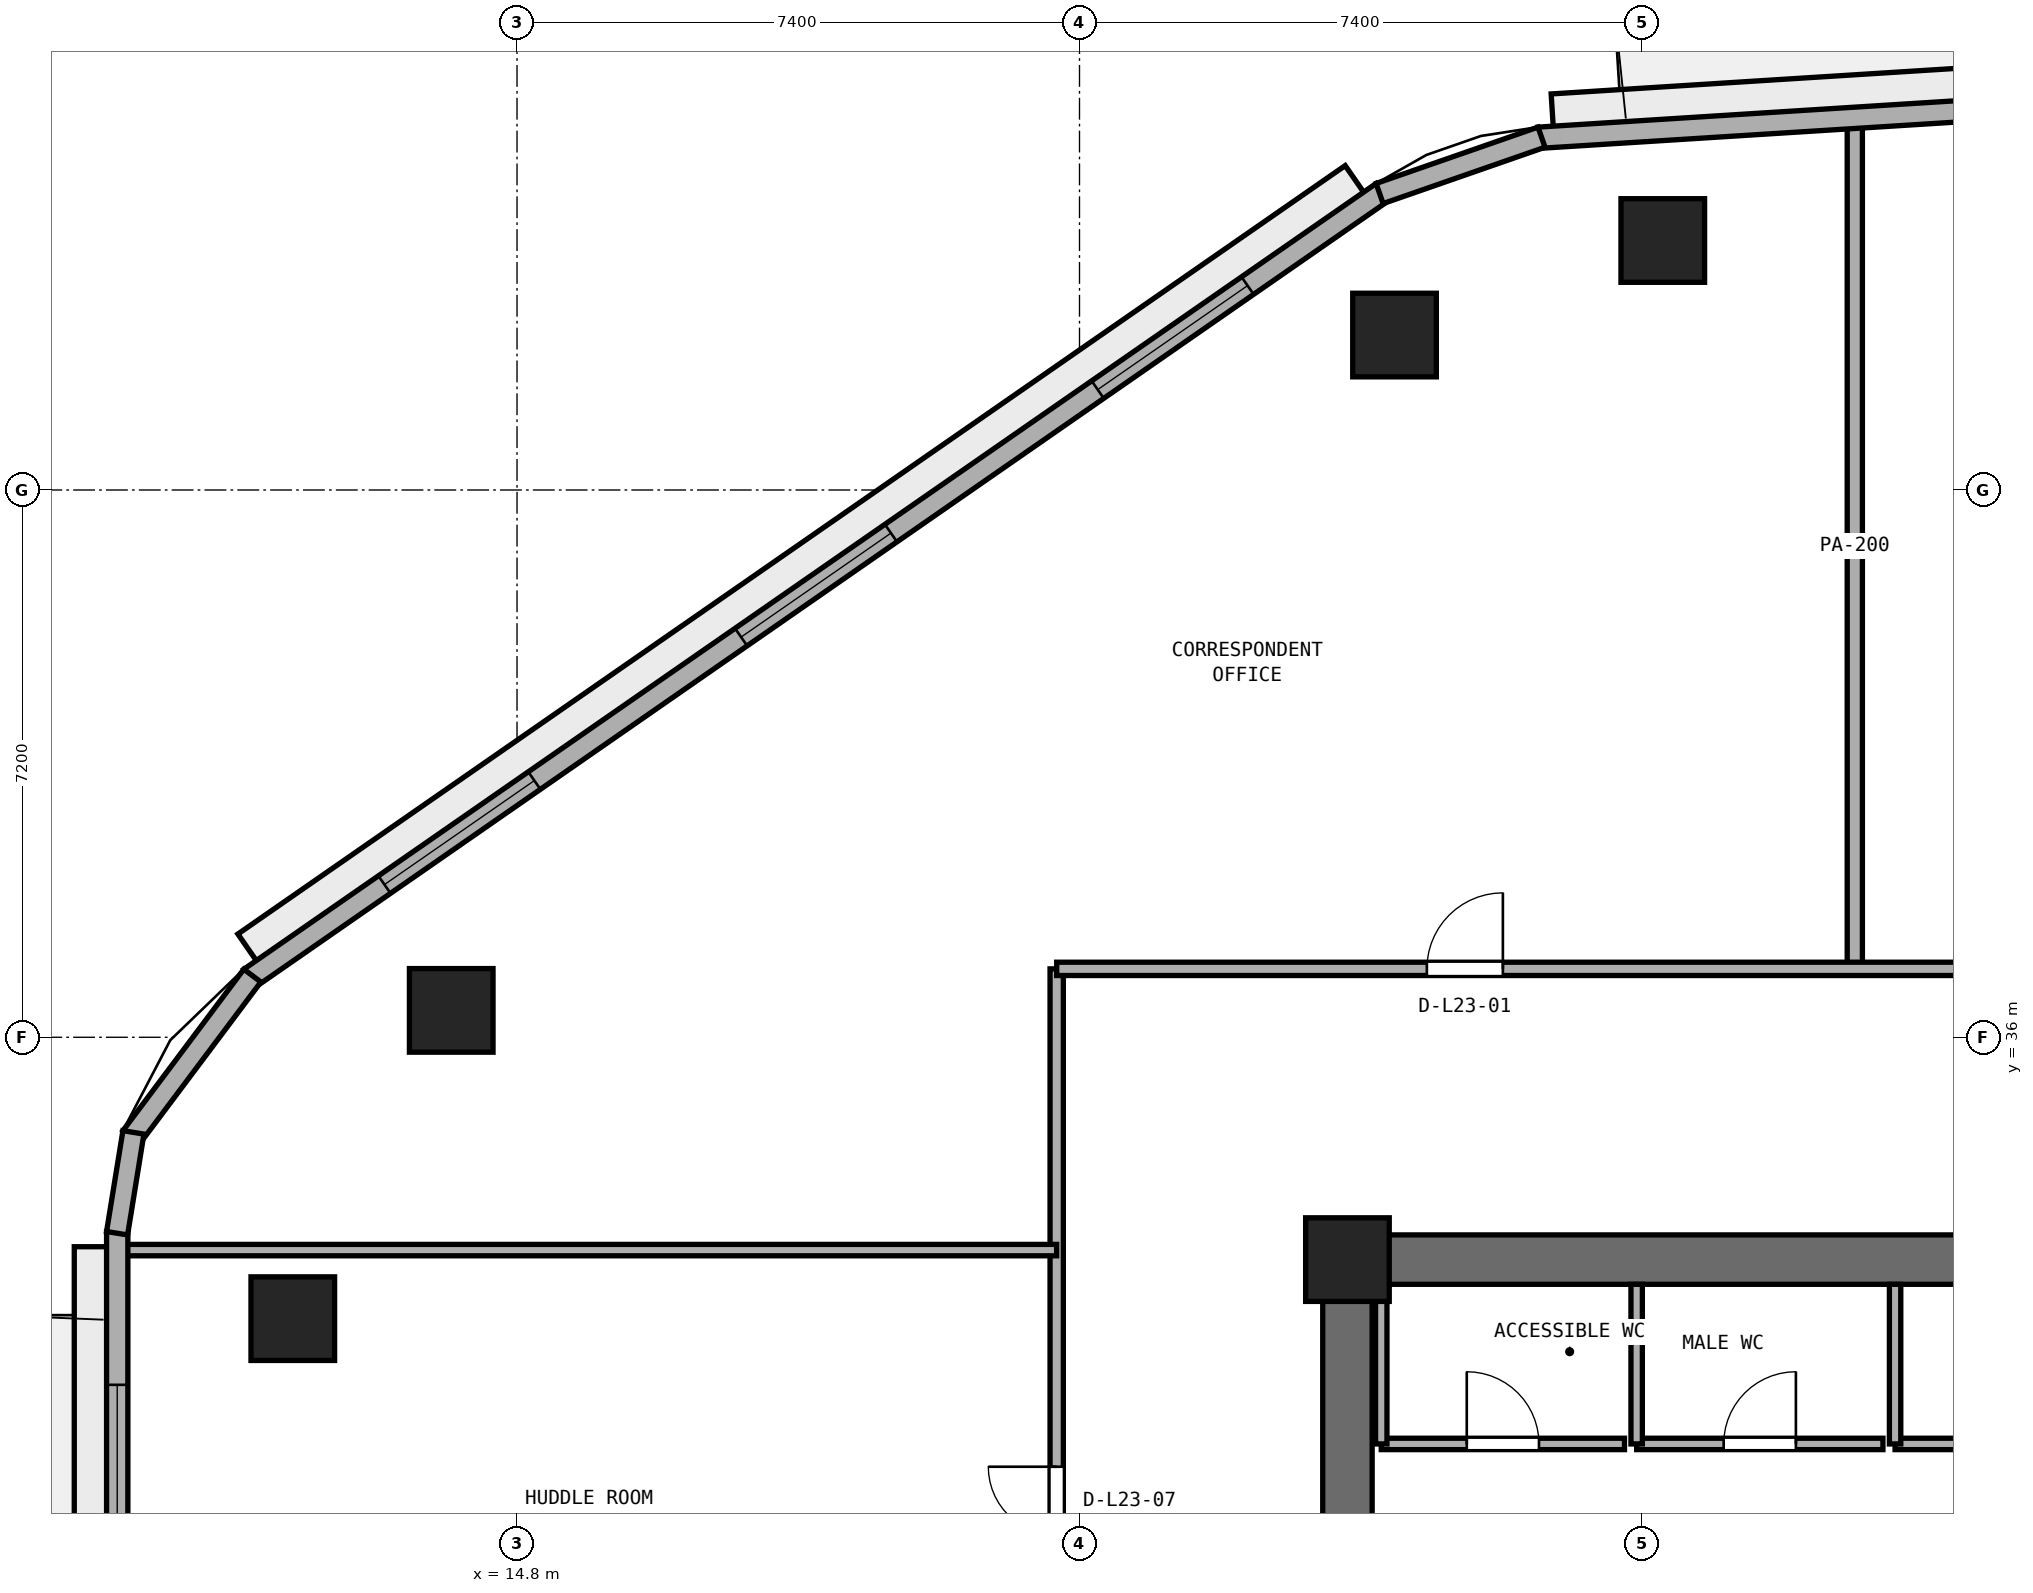
"""IFC4 building model, lengths in metres.
Left out: names, types, materials, properties, quantities, classifications, styles, units other than length and angle.
Written with IfcOpenShell. Run it as: python <this file> out.ifc"""

import sys

from ifc_helpers import new_model, si_unit, direction, frame, frame_2d, origin, origin_2d, place, context, subcontext, project, spatial, rectangle, extrude, element, fill, save


model = new_model("IFC4")
c1 = context("Model", 3, precision=1e-05, world=origin(), true_north=direction((0.0, 1.0)))
c2 = subcontext(c1, "Body", "Model", "MODEL_VIEW")
j1 = project(units=[si_unit("LENGTHUNIT", "METRE"), si_unit("PLANEANGLEUNIT", "RADIAN")], contexts=[c1])
p1 = place(None, origin())
s1 = spatial("IfcSite", under=j1, at=p1, CompositionType="ELEMENT")
p2 = place(p1, origin())
s2 = spatial("IfcBuilding", under=s1, at=p2, CompositionType="ELEMENT")
p3 = place(p2, frame((0.0, 0.0, 93.4)))
s3 = spatial("IfcBuildingStorey", under=s2, at=p3, CompositionType="ELEMENT", Elevation=93.4)
p4 = place(p3, frame((25.4, 33.075, 0.0), z_axis=(0.0, 0.0, 1.0), x_axis=(1.0, 0.0, 0.0)))
e1 = element("IfcWall", 1, at=p4, inside=s3, PredefinedType="SHEAR", context=c2, shape_type="SweptSolid", body=[
    extrude(rectangle(XDim=23.2, YDim=0.65, at=frame_2d((11.6, 0.0))), origin(), (0.0, 0.0, 1.0), 3.525),
])
p5 = place(p3, frame((25.725, 17.65, 0.0), z_axis=(0.0, 0.0, 1.0), x_axis=(0.0, 1.0, 0.0)))
e2 = element("IfcWall", 2, at=p5, inside=s3, PredefinedType="SHEAR", context=c2, shape_type="SweptSolid", body=[
    extrude(rectangle(XDim=15.1, YDim=0.65, at=frame_2d((7.55, 0.0))), origin(), (0.0, 0.0, 1.0), 3.525),
])
p6 = place(p5, frame((6.8, 0.0, 0.0)))
e3 = element("IfcOpeningElement", 3, at=p6, cuts=e2, PredefinedType="OPENING", context=c2, shape_type="SweptSolid", body=[
    extrude(rectangle(XDim=1.5, YDim=2.15, at=frame_2d((0.75, 1.075))), frame((0.0, 0.335, 0.0), z_axis=(0.0, -1.0, 0.0), x_axis=(1.0, 0.0, 0.0)), (0.0, 0.0, 1.0), 0.67),
])
p7 = place(p3, frame((25.725, 33.075, 0.0), z_axis=(0.0, 0.0, 1.0), x_axis=(1.0, 0.0, 0.0)))
e4 = element("IfcColumn", 4, at=p7, inside=s3, PredefinedType="PILASTER", context=c2, shape_type="SweptSolid", body=[
    extrude(rectangle(XDim=1.1, YDim=1.1, at=origin_2d()), origin(), (0.0, 0.0, 1.0), 3.8),
])
for number, where, z_axis, x_axis in (
    (5, (29.874, 46.482, 0.0), (0.0, 0.0, 1.0), (1.0, 0.0, 0.0)),
    (6, (26.344, 45.238, 0.0), (0.0, 0.0, 1.0), (1.0, 0.0, 0.0)),
    (7, (13.934, 36.354, 0.0), (0.0, 0.0, 1.0), (1.0, 0.0, 0.0)),
    (8, (11.85, 32.298, 0.0), (0.0, 0.0, 1.0), (1.0, 0.0, 0.0)),
):
    element("IfcColumn", number, at=place(p3, frame(where, z_axis=z_axis, x_axis=x_axis)), inside=s3, PredefinedType="COLUMN", context=c2, shape_type="SweptSolid", body=[
        extrude(rectangle(XDim=1.1, YDim=1.1, at=origin_2d()), origin(), (0.0, 0.0, 1.0), 3.8),
    ])
p8 = place(p3, frame((26.17, 30.65, 0.0), z_axis=(0.0, 0.0, 1.0), x_axis=(1.0, 0.0, 0.0)))
e9 = element("IfcWall", 9, at=p8, inside=s3, PredefinedType="PARTITIONING", context=c2, shape_type="SweptSolid", body=[
    extrude(rectangle(XDim=3.2, YDim=0.15, at=frame_2d((1.6, 0.0))), origin(), (0.0, 0.0, 1.0), 3.525),
])
p9 = place(p8, frame((1.125, 0.0, 0.0)))
e10 = element("IfcOpeningElement", 10, at=p9, cuts=e9, PredefinedType="OPENING", context=c2, shape_type="SweptSolid", body=[
    extrude(rectangle(XDim=0.95, YDim=2.1, at=frame_2d((0.475, 1.05))), frame((0.0, 0.085, 0.0), z_axis=(0.0, -1.0, 0.0), x_axis=(1.0, 0.0, 0.0)), (0.0, 0.0, 1.0), 0.17),
])
p10 = place(p3, frame((26.17, 30.65, 0.0), z_axis=(0.0, 0.0, 1.0), x_axis=(0.0, 1.0, 0.0)))
e11 = element("IfcWall", 11, at=p10, inside=s3, PredefinedType="PARTITIONING", context=c2, shape_type="SweptSolid", body=[
    extrude(rectangle(XDim=2.1, YDim=0.15, at=frame_2d((1.05, 0.0))), origin(), (0.0, 0.0, 1.0), 3.525),
])
p11 = place(p3, frame((29.53, 30.65, 0.0), z_axis=(0.0, 0.0, 1.0), x_axis=(1.0, 0.0, 0.0)))
e12 = element("IfcWall", 12, at=p11, inside=s3, PredefinedType="PARTITIONING", context=c2, shape_type="SweptSolid", body=[
    extrude(rectangle(XDim=3.24, YDim=0.15, at=frame_2d((1.62, 0.0))), origin(), (0.0, 0.0, 1.0), 3.525),
])
p12 = place(p11, frame((1.145, 0.0, 0.0)))
e13 = element("IfcOpeningElement", 13, at=p12, cuts=e12, PredefinedType="OPENING", context=c2, shape_type="SweptSolid", body=[
    extrude(rectangle(XDim=0.95, YDim=2.1, at=frame_2d((0.475, 1.05))), frame((0.0, 0.085, 0.0), z_axis=(0.0, -1.0, 0.0), x_axis=(1.0, 0.0, 0.0)), (0.0, 0.0, 1.0), 0.17),
])
p13 = place(p3, frame((29.53, 30.65, 0.0), z_axis=(0.0, 0.0, 1.0), x_axis=(0.0, 1.0, 0.0)))
e14 = element("IfcWall", 14, at=p13, inside=s3, PredefinedType="PARTITIONING", context=c2, shape_type="SweptSolid", body=[
    extrude(rectangle(XDim=2.1, YDim=0.15, at=frame_2d((1.05, 0.0))), origin(), (0.0, 0.0, 1.0), 3.525),
])
p14 = place(p3, frame((32.93, 30.65, 0.0), z_axis=(0.0, 0.0, 1.0), x_axis=(1.0, 0.0, 0.0)))
e15 = element("IfcWall", 15, at=p14, inside=s3, PredefinedType="PARTITIONING", context=c2, shape_type="SweptSolid", body=[
    extrude(rectangle(XDim=3.92, YDim=0.15, at=frame_2d((1.96, 0.0))), origin(), (0.0, 0.0, 1.0), 3.525),
])
p15 = place(p14, frame((1.51, 0.0, 0.0)))
e16 = element("IfcOpeningElement", 16, at=p15, cuts=e15, PredefinedType="OPENING", context=c2, shape_type="SweptSolid", body=[
    extrude(rectangle(XDim=0.9, YDim=2.1, at=frame_2d((0.45, 1.05))), frame((0.0, 0.085, 0.0), z_axis=(0.0, -1.0, 0.0), x_axis=(1.0, 0.0, 0.0)), (0.0, 0.0, 1.0), 0.17),
])
p16 = place(p3, frame((32.93, 30.65, 0.0), z_axis=(0.0, 0.0, 1.0), x_axis=(0.0, 1.0, 0.0)))
e17 = element("IfcWall", 17, at=p16, inside=s3, PredefinedType="PARTITIONING", context=c2, shape_type="SweptSolid", body=[
    extrude(rectangle(XDim=2.1, YDim=0.15, at=frame_2d((1.05, 0.0))), origin(), (0.0, 0.0, 1.0), 3.525),
])
p17 = place(p3, frame((32.4, 36.901, 0.0), z_axis=(0.0, 0.0, 1.0), x_axis=(0.0, 1.0, 0.0)))
e18 = element("IfcWall", 18, at=p17, inside=s3, PredefinedType="PARTITIONING", context=c2, shape_type="SweptSolid", body=[
    extrude(rectangle(XDim=11.131, YDim=0.2, at=frame_2d((5.565, 0.0))), origin(), (0.0, 0.0, 1.0), 3.525),
])
p18 = place(p3, frame((21.9, 5.958, 0.0), z_axis=(0.0, 0.0, 1.0), x_axis=(0.0, 1.0, 0.0)))
e19 = element("IfcWall", 19, at=p18, inside=s3, PredefinedType="PARTITIONING", context=c2, shape_type="SweptSolid", body=[
    extrude(rectangle(XDim=30.942, YDim=0.175, at=frame_2d((15.471, 0.0))), origin(), (0.0, 0.0, 1.0), 3.525),
])
p19 = place(p18, frame((10.292, 0.0, 0.0)))
e20 = element("IfcOpeningElement", 20, at=p19, cuts=e19, PredefinedType="OPENING", context=c2, shape_type="SweptSolid", body=[
    extrude(rectangle(XDim=1.0, YDim=2.12, at=frame_2d((0.5, 1.06))), frame((0.0, 0.097, 0.0), z_axis=(0.0, -1.0, 0.0), x_axis=(1.0, 0.0, 0.0)), (0.0, 0.0, 1.0), 0.195),
])
p20 = place(p18, frame((16.842, 0.0, 0.0)))
e21 = element("IfcOpeningElement", 21, at=p20, cuts=e19, PredefinedType="OPENING", context=c2, shape_type="SweptSolid", body=[
    extrude(rectangle(XDim=1.0, YDim=2.12, at=frame_2d((0.5, 1.06))), frame((0.0, 0.097, 0.0), z_axis=(0.0, -1.0, 0.0), x_axis=(1.0, 0.0, 0.0)), (0.0, 0.0, 1.0), 0.195),
])
p21 = place(p18, frame((23.492, 0.0, 0.0)))
e22 = element("IfcOpeningElement", 22, at=p21, cuts=e19, PredefinedType="OPENING", context=c2, shape_type="SweptSolid", body=[
    extrude(rectangle(XDim=0.9, YDim=2.1, at=frame_2d((0.45, 1.05))), frame((0.0, 0.097, 0.0), z_axis=(0.0, -1.0, 0.0), x_axis=(1.0, 0.0, 0.0)), (0.0, 0.0, 1.0), 0.195),
])
p22 = place(p3, frame((9.605, 33.2, 0.0), z_axis=(0.0, 0.0, 1.0), x_axis=(1.0, 0.0, 0.0)))
e23 = element("IfcWall", 23, at=p22, inside=s3, PredefinedType="PARTITIONING", context=c2, shape_type="SweptSolid", body=[
    extrude(rectangle(XDim=12.294, YDim=0.15, at=frame_2d((6.147, 0.0))), origin(), (0.0, 0.0, 1.0), 3.525),
])
p23 = place(p3, frame((21.9, 36.9, 0.0), z_axis=(0.0, 0.0, 1.0), x_axis=(1.0, 0.0, 0.0)))
e24 = element("IfcWall", 24, at=p23, inside=s3, PredefinedType="PARTITIONING", context=c2, shape_type="SweptSolid", body=[
    extrude(rectangle(XDim=30.2, YDim=0.175, at=frame_2d((15.1, 0.0))), origin(), (0.0, 0.0, 1.0), 3.525),
])
p24 = place(p23, frame((4.87, 0.0, 0.0)))
e25 = element("IfcOpeningElement", 25, at=p24, cuts=e24, PredefinedType="OPENING", context=c2, shape_type="SweptSolid", body=[
    extrude(rectangle(XDim=1.0, YDim=2.12, at=frame_2d((0.5, 1.06))), frame((0.0, 0.097, 0.0), z_axis=(0.0, -1.0, 0.0), x_axis=(1.0, 0.0, 0.0)), (0.0, 0.0, 1.0), 0.195),
])
p25 = place(p23, frame((15.75, 0.0, 0.0)))
e26 = element("IfcOpeningElement", 26, at=p25, cuts=e24, PredefinedType="OPENING", context=c2, shape_type="SweptSolid", body=[
    extrude(rectangle(XDim=1.0, YDim=2.12, at=frame_2d((0.5, 1.06))), frame((0.0, 0.097, 0.0), z_axis=(0.0, -1.0, 0.0), x_axis=(1.0, 0.0, 0.0)), (0.0, 0.0, 1.0), 0.195),
])
p26 = place(p23, frame((25.48, 0.0, 0.0)))
e27 = element("IfcOpeningElement", 27, at=p26, cuts=e24, PredefinedType="OPENING", context=c2, shape_type="SweptSolid", body=[
    extrude(rectangle(XDim=1.0, YDim=2.12, at=frame_2d((0.5, 1.06))), frame((0.0, 0.097, 0.0), z_axis=(0.0, -1.0, 0.0), x_axis=(1.0, 0.0, 0.0)), (0.0, 0.0, 1.0), 0.195),
])
p27 = place(p3, frame((47.832, 49.069, 0.0), z_axis=(0.0, 0.0, 1.0), x_axis=(-0.998017725054, -0.062933460723, 0.0)))
e28 = element("IfcWall", 28, at=p27, inside=s3, PredefinedType="STANDARD", context=c2, shape_type="SweptSolid", body=[
    extrude(rectangle(XDim=19.629, YDim=0.28, at=frame_2d((9.815, 0.0))), origin(), (0.0, 0.0, 1.0), 3.525),
])
p28 = place(p27, frame((9.265, 0.0, 0.0)))
e29 = element("IfcOpeningElement", 29, at=p28, cuts=e28, PredefinedType="OPENING", context=c2, shape_type="SweptSolid", body=[
    extrude(rectangle(XDim=1.1, YDim=2.2, at=frame_2d((0.55, 1.1))), frame((0.0, 0.15, 0.0), z_axis=(0.0, -1.0, 0.0), x_axis=(1.0, 0.0, 0.0)), (0.0, 0.0, 1.0), 0.3),
])
p29 = place(p3, frame((26.182, 47.118, 0.0), z_axis=(0.0, 0.0, 1.0), x_axis=(-0.821547956627, -0.570139417127, 0.0)))
e30 = element("IfcWall", 30, at=p29, inside=s3, PredefinedType="STANDARD", context=c2, shape_type="SweptSolid", body=[
    extrude(rectangle(XDim=18.132, YDim=0.28, at=frame_2d((9.066, 0.0))), origin(), (0.0, 0.0, 1.0), 3.525),
])
p30 = place(p29, frame((2.156, 0.0, 0.9)))
e31 = element("IfcOpeningElement", 31, at=p30, cuts=e30, PredefinedType="OPENING", context=c2, shape_type="SweptSolid", body=[
    extrude(rectangle(XDim=2.4, YDim=1.75, at=frame_2d((1.2, 0.875))), frame((0.0, 0.15, 0.0), z_axis=(0.0, -1.0, 0.0), x_axis=(1.0, 0.0, 0.0)), (0.0, 0.0, 1.0), 0.3),
])
p31 = place(p29, frame((7.866, 0.0, 0.9)))
e32 = element("IfcOpeningElement", 32, at=p31, cuts=e30, PredefinedType="OPENING", context=c2, shape_type="SweptSolid", body=[
    extrude(rectangle(XDim=2.4, YDim=1.75, at=frame_2d((1.2, 0.875))), frame((0.0, 0.15, 0.0), z_axis=(0.0, -1.0, 0.0), x_axis=(1.0, 0.0, 0.0)), (0.0, 0.0, 1.0), 0.3),
])
p32 = place(p29, frame((13.577, 0.0, 0.9)))
e33 = element("IfcOpeningElement", 33, at=p32, cuts=e30, PredefinedType="OPENING", context=c2, shape_type="SweptSolid", body=[
    extrude(rectangle(XDim=2.4, YDim=1.75, at=frame_2d((1.2, 0.875))), frame((0.0, 0.15, 0.0), z_axis=(0.0, -1.0, 0.0), x_axis=(1.0, 0.0, 0.0)), (0.0, 0.0, 1.0), 0.3),
])
p33 = place(p3, frame((9.54, 33.444, 0.0), z_axis=(0.0, 0.0, 1.0), x_axis=(0.0, -1.0, 0.0)))
e34 = element("IfcWall", 34, at=p33, inside=s3, PredefinedType="STANDARD", context=c2, shape_type="SweptSolid", body=[
    extrude(rectangle(XDim=17.301, YDim=0.28, at=frame_2d((8.65, 0.0))), origin(), (0.0, 0.0, 1.0), 3.525),
])
p34 = place(p33, frame((8.1, 0.0, 0.0)))
e35 = element("IfcOpeningElement", 35, at=p34, cuts=e34, PredefinedType="OPENING", context=c2, shape_type="SweptSolid", body=[
    extrude(rectangle(XDim=1.1, YDim=2.2, at=frame_2d((0.55, 1.1))), frame((0.0, 0.15, 0.0), z_axis=(0.0, -1.0, 0.0), x_axis=(1.0, 0.0, 0.0)), (0.0, 0.0, 1.0), 0.3),
])
p35 = place(p33, frame((2.017, 0.0, 0.9)))
e36 = element("IfcOpeningElement", 36, at=p35, cuts=e34, PredefinedType="OPENING", context=c2, shape_type="SweptSolid", body=[
    extrude(rectangle(XDim=2.4, YDim=1.75, at=frame_2d((1.2, 0.875))), frame((0.0, 0.15, 0.0), z_axis=(0.0, -1.0, 0.0), x_axis=(1.0, 0.0, 0.0)), (0.0, 0.0, 1.0), 0.3),
])
p36 = place(p3, frame((28.278, 47.842, 0.0), z_axis=(0.0, 0.0, 1.0), x_axis=(-0.9444559001, -0.328638179106, 0.0)))
e37 = element("IfcWall", 37, at=p36, inside=s3, PredefinedType="STANDARD", context=c2, shape_type="SweptSolid", body=[
    extrude(rectangle(XDim=2.255, YDim=0.28, at=frame_2d((1.128, 0.0))), origin(), (0.0, 0.0, 1.0), 3.525),
])
p37 = place(p3, frame((11.318, 36.811, 0.0), z_axis=(0.0, 0.0, 1.0), x_axis=(-0.599455152629, -0.800408345775, 0.0)))
e38 = element("IfcWall", 38, at=p37, inside=s3, PredefinedType="STANDARD", context=c2, shape_type="SweptSolid", body=[
    extrude(rectangle(XDim=2.653, YDim=0.28, at=frame_2d((1.327, 0.0))), origin(), (0.0, 0.0, 1.0), 3.525),
])
p38 = place(p3, frame((9.753, 34.749, 0.0), z_axis=(0.0, 0.0, 1.0), x_axis=(-0.160037671962, -0.987110907423, 0.0)))
e39 = element("IfcWall", 39, at=p38, inside=s3, PredefinedType="STANDARD", context=c2, shape_type="SweptSolid", body=[
    extrude(rectangle(XDim=1.344, YDim=0.28, at=frame_2d((0.672, 0.0))), origin(), (0.0, 0.0, 1.0), 3.525),
])
p39 = place(p9, origin())
e40 = element("IfcDoor", 40, at=p39, inside=s3, OperationType="SINGLE_SWING_LEFT", PredefinedType="DOOR", context=c2, shape_type="SweptSolid", body=[
    extrude(rectangle(XDim=0.95, YDim=2.1, at=frame_2d((0.475, 1.05))), frame((0.0, 0.025, 0.0), z_axis=(0.0, -1.0, 0.0), x_axis=(1.0, 0.0, 0.0)), (0.0, 0.0, 1.0), 0.05),
])
fill(e10, e40)
p40 = place(p12, origin())
e41 = element("IfcDoor", 41, at=p40, inside=s3, OperationType="SINGLE_SWING_RIGHT", PredefinedType="DOOR", context=c2, shape_type="SweptSolid", body=[
    extrude(rectangle(XDim=0.95, YDim=2.1, at=frame_2d((0.475, 1.05))), frame((0.0, 0.025, 0.0), z_axis=(0.0, -1.0, 0.0), x_axis=(1.0, 0.0, 0.0)), (0.0, 0.0, 1.0), 0.05),
])
fill(e13, e41)
p41 = place(p24, origin())
e42 = element("IfcDoor", 42, at=p41, inside=s3, OperationType="SINGLE_SWING_RIGHT", PredefinedType="DOOR", context=c2, shape_type="SweptSolid", body=[
    extrude(rectangle(XDim=1.0, YDim=2.12, at=frame_2d((0.5, 1.06))), frame((0.0, 0.025, 0.0), z_axis=(0.0, -1.0, 0.0), x_axis=(1.0, 0.0, 0.0)), (0.0, 0.0, 1.0), 0.05),
])
fill(e25, e42)
p42 = place(p21, origin())
e43 = element("IfcDoor", 43, at=p42, inside=s3, OperationType="SINGLE_SWING_RIGHT", PredefinedType="DOOR", context=c2, shape_type="SweptSolid", body=[
    extrude(rectangle(XDim=0.9, YDim=2.1, at=frame_2d((0.45, 1.05))), frame((0.0, 0.025, 0.0), z_axis=(0.0, -1.0, 0.0), x_axis=(1.0, 0.0, 0.0)), (0.0, 0.0, 1.0), 0.05),
])
fill(e22, e43)
p43 = place(p30, origin())
e44 = element("IfcWindow", 44, at=p43, inside=s3, PartitioningType="SINGLE_PANEL", PredefinedType="WINDOW", context=c2, shape_type="SweptSolid", body=[
    extrude(rectangle(XDim=2.4, YDim=1.75, at=frame_2d((1.2, 0.875))), frame((0.0, 0.03, 0.0), z_axis=(0.0, -1.0, 0.0), x_axis=(1.0, 0.0, 0.0)), (0.0, 0.0, 1.0), 0.06),
])
fill(e31, e44)
p44 = place(p31, origin())
e45 = element("IfcWindow", 45, at=p44, inside=s3, PartitioningType="SINGLE_PANEL", PredefinedType="WINDOW", context=c2, shape_type="SweptSolid", body=[
    extrude(rectangle(XDim=2.4, YDim=1.75, at=frame_2d((1.2, 0.875))), frame((0.0, 0.03, 0.0), z_axis=(0.0, -1.0, 0.0), x_axis=(1.0, 0.0, 0.0)), (0.0, 0.0, 1.0), 0.06),
])
fill(e32, e45)
p45 = place(p32, origin())
e46 = element("IfcWindow", 46, at=p45, inside=s3, PartitioningType="SINGLE_PANEL", PredefinedType="WINDOW", context=c2, shape_type="SweptSolid", body=[
    extrude(rectangle(XDim=2.4, YDim=1.75, at=frame_2d((1.2, 0.875))), frame((0.0, 0.03, 0.0), z_axis=(0.0, -1.0, 0.0), x_axis=(1.0, 0.0, 0.0)), (0.0, 0.0, 1.0), 0.06),
])
fill(e33, e46)
p46 = place(p35, origin())
e47 = element("IfcWindow", 47, at=p46, inside=s3, PartitioningType="SINGLE_PANEL", PredefinedType="WINDOW", context=c2, shape_type="SweptSolid", body=[
    extrude(rectangle(XDim=2.4, YDim=1.75, at=frame_2d((1.2, 0.875))), frame((0.0, 0.03, 0.0), z_axis=(0.0, -1.0, 0.0), x_axis=(1.0, 0.0, 0.0)), (0.0, 0.0, 1.0), 0.06),
])
fill(e36, e47)
save(model, sys.argv[1])
